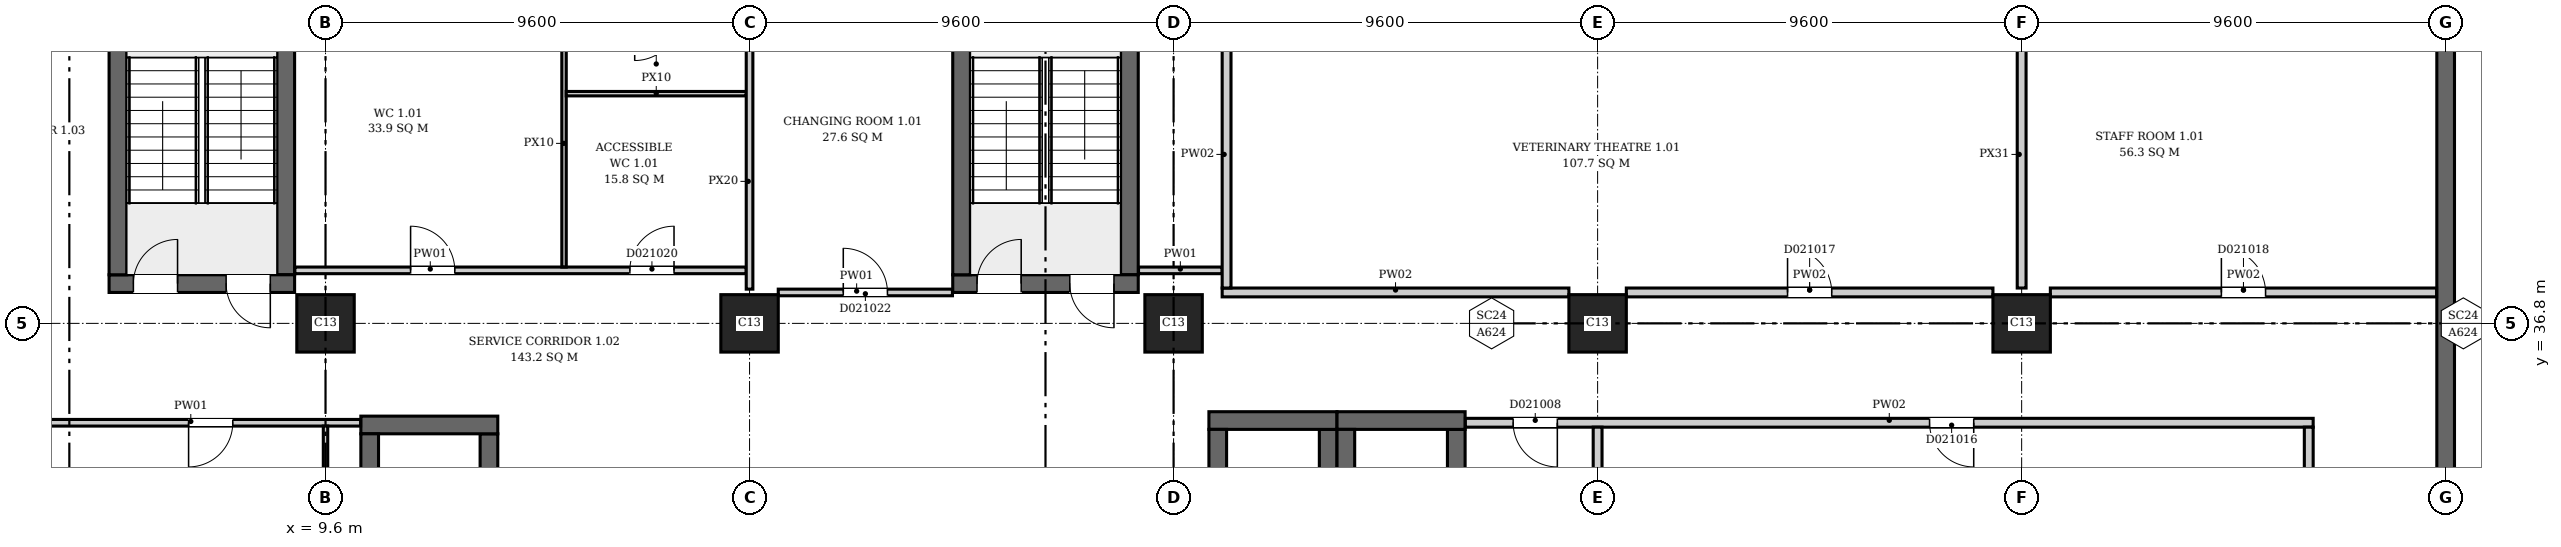
"""IFC4 building model, lengths in metres.
Left out: names, types, materials, properties, quantities, classifications, styles, units other than length and angle.
Written with IfcOpenShell. Run it as: python <this file> out.ifc"""

import sys

from ifc_helpers import new_model, si_unit, direction, frame, frame_2d, origin, origin_2d, place, context, subcontext, project, spatial, rectangle, extrude, element, fill, save


model = new_model("IFC4")
c1 = context("Model", 3, precision=1e-05, world=origin(), true_north=direction((0.0, 1.0)))
c2 = subcontext(c1, "Body", "Model", "MODEL_VIEW")
j1 = project(units=[si_unit("LENGTHUNIT", "METRE"), si_unit("PLANEANGLEUNIT", "RADIAN")], contexts=[c1])
p1 = place(None, origin())
s1 = spatial("IfcSite", under=j1, at=p1, CompositionType="ELEMENT")
p2 = place(p1, origin())
s2 = spatial("IfcBuilding", under=s1, at=p2, CompositionType="ELEMENT")
p3 = place(p2, frame((0.0, 0.0, 6.5)))
s3 = spatial("IfcBuildingStorey", under=s2, at=p3, CompositionType="ELEMENT", Elevation=6.5)
p4 = place(p3, frame((57.6, -0.2, 0.0), z_axis=(0.0, 0.0, 1.0), x_axis=(0.0, 1.0, 0.0)))
e1 = element("IfcWall", 1, at=p4, inside=s3, PredefinedType="SHEAR", context=c2, shape_type="SweptSolid", body=[
    extrude(rectangle(XDim=46.88, YDim=0.4, at=frame_2d((23.44, 0.0))), origin(), (0.0, 0.0, 1.0), 7.7),
])
p5 = place(p3, frame((4.7, 37.7, 0.0), z_axis=(0.0, 0.0, 1.0), x_axis=(1.0, 0.0, 0.0)))
e2 = element("IfcWall", 2, at=p5, inside=s3, PredefinedType="SHEAR", context=c2, shape_type="SweptSolid", body=[
    extrude(rectangle(XDim=4.2, YDim=0.4, at=frame_2d((2.1, 0.0))), origin(), (0.0, 0.0, 1.0), 7.7),
])
p6 = place(p5, frame((0.55, 0.0, 0.0)))
e3 = element("IfcOpeningElement", 3, at=p6, cuts=e2, PredefinedType="OPENING", context=c2, shape_type="SweptSolid", body=[
    extrude(rectangle(XDim=1.0, YDim=2.1, at=frame_2d((0.5, 1.05))), frame((0.0, 0.21, 0.0), z_axis=(0.0, -1.0, 0.0), x_axis=(1.0, 0.0, 0.0)), (0.0, 0.0, 1.0), 0.42),
])
p7 = place(p5, frame((2.65, 0.0, 0.0)))
e4 = element("IfcOpeningElement", 4, at=p7, cuts=e2, PredefinedType="OPENING", context=c2, shape_type="SweptSolid", body=[
    extrude(rectangle(XDim=1.0, YDim=2.1, at=frame_2d((0.5, 1.05))), frame((0.0, 0.21, 0.0), z_axis=(0.0, -1.0, 0.0), x_axis=(1.0, 0.0, 0.0)), (0.0, 0.0, 1.0), 0.42),
])
for number, where, z_axis, x_axis in (
    (5, (4.9, 37.9, 0.0), (0.0, 0.0, 1.0), (0.0, 1.0, 0.0)),
    (6, (8.7, 37.9, 0.0), (0.0, 0.0, 1.0), (0.0, 1.0, 0.0)),
):
    element("IfcWall", number, at=place(p3, frame(where, z_axis=z_axis, x_axis=x_axis)), inside=s3, PredefinedType="SHEAR", context=c2, shape_type="SweptSolid", body=[
        extrude(rectangle(XDim=6.6, YDim=0.4, at=frame_2d((3.3, 0.0))), origin(), (0.0, 0.0, 1.0), 7.7),
    ])
p8 = place(p3, frame((23.8, 37.7, 0.0), z_axis=(0.0, 0.0, 1.0), x_axis=(1.0, 0.0, 0.0)))
e7 = element("IfcWall", 7, at=p8, inside=s3, PredefinedType="SHEAR", context=c2, shape_type="SweptSolid", body=[
    extrude(rectangle(XDim=4.2, YDim=0.4, at=frame_2d((2.1, 0.0))), origin(), (0.0, 0.0, 1.0), 7.7),
])
p9 = place(p8, frame((0.55, 0.0, 0.0)))
e8 = element("IfcOpeningElement", 8, at=p9, cuts=e7, PredefinedType="OPENING", context=c2, shape_type="SweptSolid", body=[
    extrude(rectangle(XDim=1.0, YDim=2.1, at=frame_2d((0.5, 1.05))), frame((0.0, 0.21, 0.0), z_axis=(0.0, -1.0, 0.0), x_axis=(1.0, 0.0, 0.0)), (0.0, 0.0, 1.0), 0.42),
])
p10 = place(p8, frame((2.65, 0.0, 0.0)))
e9 = element("IfcOpeningElement", 9, at=p10, cuts=e7, PredefinedType="OPENING", context=c2, shape_type="SweptSolid", body=[
    extrude(rectangle(XDim=1.0, YDim=2.1, at=frame_2d((0.5, 1.05))), frame((0.0, 0.21, 0.0), z_axis=(0.0, -1.0, 0.0), x_axis=(1.0, 0.0, 0.0)), (0.0, 0.0, 1.0), 0.42),
])
for number, where, z_axis, x_axis in (
    (10, (24.0, 37.9, 0.0), (0.0, 0.0, 1.0), (0.0, 1.0, 0.0)),
    (11, (27.8, 37.9, 0.0), (0.0, 0.0, 1.0), (0.0, 1.0, 0.0)),
):
    element("IfcWall", number, at=place(p3, frame(where, z_axis=z_axis, x_axis=x_axis)), inside=s3, PredefinedType="SHEAR", context=c2, shape_type="SweptSolid", body=[
        extrude(rectangle(XDim=6.6, YDim=0.4, at=frame_2d((3.3, 0.0))), origin(), (0.0, 0.0, 1.0), 7.7),
    ])
p11 = place(p3, frame((10.4, 34.5, 0.0), z_axis=(0.0, 0.0, 1.0), x_axis=(1.0, 0.0, 0.0)))
e12 = element("IfcWall", 12, at=p11, inside=s3, PredefinedType="SHEAR", context=c2, shape_type="SweptSolid", body=[
    extrude(rectangle(XDim=3.1, YDim=0.4, at=frame_2d((1.55, 0.0))), origin(), (0.0, 0.0, 1.0), 7.7),
])
for number, where, z_axis, x_axis in (
    (13, (10.6, 30.9, 0.0), (0.0, 0.0, 1.0), (0.0, 1.0, 0.0)),
    (14, (13.3, 30.9, 0.0), (0.0, 0.0, 1.0), (0.0, 1.0, 0.0)),
):
    element("IfcWall", number, at=place(p3, frame(where, z_axis=z_axis, x_axis=x_axis)), inside=s3, PredefinedType="SHEAR", context=c2, shape_type="SweptSolid", body=[
        extrude(rectangle(XDim=3.4, YDim=0.4, at=frame_2d((1.7, 0.0))), origin(), (0.0, 0.0, 1.0), 7.7),
    ])
p12 = place(p3, frame((29.6, 34.6, 0.0), z_axis=(0.0, 0.0, 1.0), x_axis=(1.0, 0.0, 0.0)))
e15 = element("IfcWall", 15, at=p12, inside=s3, PredefinedType="SHEAR", context=c2, shape_type="SweptSolid", body=[
    extrude(rectangle(XDim=2.9, YDim=0.4, at=frame_2d((1.45, 0.0))), origin(), (0.0, 0.0, 1.0), 7.7),
])
for number, where, z_axis, x_axis in (
    (16, (29.8, 31.4, 0.0), (0.0, 0.0, 1.0), (0.0, 1.0, 0.0)),
    (17, (32.3, 31.4, 0.0), (0.0, 0.0, 1.0), (0.0, 1.0, 0.0)),
):
    element("IfcWall", number, at=place(p3, frame(where, z_axis=z_axis, x_axis=x_axis)), inside=s3, PredefinedType="SHEAR", context=c2, shape_type="SweptSolid", body=[
        extrude(rectangle(XDim=3.0, YDim=0.4, at=frame_2d((1.5, 0.0))), origin(), (0.0, 0.0, 1.0), 7.7),
    ])
p13 = place(p3, frame((32.5, 34.6, 0.0), z_axis=(0.0, 0.0, 1.0), x_axis=(1.0, 0.0, 0.0)))
e18 = element("IfcWall", 18, at=p13, inside=s3, PredefinedType="SHEAR", context=c2, shape_type="SweptSolid", body=[
    extrude(rectangle(XDim=2.9, YDim=0.4, at=frame_2d((1.45, 0.0))), origin(), (0.0, 0.0, 1.0), 7.7),
])
for number, where, z_axis, x_axis in (
    (19, (32.7, 31.4, 0.0), (0.0, 0.0, 1.0), (0.0, 1.0, 0.0)),
    (20, (35.2, 31.4, 0.0), (0.0, 0.0, 1.0), (0.0, 1.0, 0.0)),
):
    element("IfcWall", number, at=place(p3, frame(where, z_axis=z_axis, x_axis=x_axis)), inside=s3, PredefinedType="SHEAR", context=c2, shape_type="SweptSolid", body=[
        extrude(rectangle(XDim=3.0, YDim=0.4, at=frame_2d((1.5, 0.0))), origin(), (0.0, 0.0, 1.0), 7.7),
    ])
for number, where, z_axis, x_axis in (
    (21, (9.6, 36.8, 0.0), (0.0, 0.0, 1.0), (1.0, 0.0, 0.0)),
    (22, (19.2, 36.8, 0.0), (0.0, 0.0, 1.0), (1.0, 0.0, 0.0)),
    (23, (28.8, 36.8, 0.0), (0.0, 0.0, 1.0), (1.0, 0.0, 0.0)),
    (24, (38.4, 36.8, 0.0), (0.0, 0.0, 1.0), (1.0, 0.0, 0.0)),
    (25, (48.0, 36.8, 0.0), (0.0, 0.0, 1.0), (1.0, 0.0, 0.0)),
):
    element("IfcColumn", number, at=place(p3, frame(where, z_axis=z_axis, x_axis=x_axis)), inside=s3, PredefinedType="COLUMN", context=c2, shape_type="SweptSolid", body=[
        extrude(rectangle(XDim=1.3, YDim=1.3, at=origin_2d()), origin(), (0.0, 0.0, 1.0), 7.7),
    ])
p14 = place(p3, frame((2.706, 34.55, 0.0), z_axis=(0.0, 0.0, 1.0), x_axis=(1.0, 0.0, 0.0)))
e26 = element("IfcWall", 26, at=p14, inside=s3, PredefinedType="PARTITIONING", context=c2, shape_type="SweptSolid", body=[
    extrude(rectangle(XDim=7.688, YDim=0.15, at=frame_2d((3.844, 0.0))), origin(), (0.0, 0.0, 1.0), 7.35),
])
p15 = place(p14, frame((3.794, 0.0, 0.0)))
e27 = element("IfcOpeningElement", 27, at=p15, cuts=e26, PredefinedType="OPENING", context=c2, shape_type="SweptSolid", body=[
    extrude(rectangle(XDim=1.0, YDim=2.1, at=frame_2d((0.5, 1.05))), frame((0.0, 0.085, 0.0), z_axis=(0.0, -1.0, 0.0), x_axis=(1.0, 0.0, 0.0)), (0.0, 0.0, 1.0), 0.17),
])
p16 = place(p3, frame((8.906, 38.0, 0.0), z_axis=(0.0, 0.0, 1.0), x_axis=(1.0, 0.0, 0.0)))
e28 = element("IfcWall", 28, at=p16, inside=s3, PredefinedType="PARTITIONING", context=c2, shape_type="SweptSolid", body=[
    extrude(rectangle(XDim=10.219, YDim=0.15, at=frame_2d((5.109, 0.0))), origin(), (0.0, 0.0, 1.0), 7.35),
])
p17 = place(p16, frame((2.62, 0.0, 0.0)))
e29 = element("IfcOpeningElement", 29, at=p17, cuts=e28, PredefinedType="OPENING", context=c2, shape_type="SweptSolid", body=[
    extrude(rectangle(XDim=1.0, YDim=2.1, at=frame_2d((0.5, 1.05))), frame((0.0, 0.085, 0.0), z_axis=(0.0, -1.0, 0.0), x_axis=(1.0, 0.0, 0.0)), (0.0, 0.0, 1.0), 0.17),
])
p18 = place(p16, frame((7.584, 0.0, 0.0)))
e30 = element("IfcOpeningElement", 30, at=p18, cuts=e28, PredefinedType="OPENING", context=c2, shape_type="SweptSolid", body=[
    extrude(rectangle(XDim=1.0, YDim=2.1, at=frame_2d((0.5, 1.05))), frame((0.0, 0.085, 0.0), z_axis=(0.0, -1.0, 0.0), x_axis=(1.0, 0.0, 0.0)), (0.0, 0.0, 1.0), 0.17),
])
p19 = place(p3, frame((9.6, 31.075, 0.0), z_axis=(0.0, 0.0, 1.0), x_axis=(0.0, 1.0, 0.0)))
e31 = element("IfcWall", 31, at=p19, inside=s3, PredefinedType="PARTITIONING", context=c2, shape_type="SweptSolid", body=[
    extrude(rectangle(XDim=3.4, YDim=0.1, at=frame_2d((1.7, 0.0))), origin(), (0.0, 0.0, 1.0), 6.95),
])
p20 = place(p3, frame((15.0, 38.075, 0.0), z_axis=(0.0, 0.0, 1.0), x_axis=(0.0, 1.0, 0.0)))
e32 = element("IfcWall", 32, at=p20, inside=s3, PredefinedType="PARTITIONING", context=c2, shape_type="SweptSolid", body=[
    extrude(rectangle(XDim=5.6, YDim=0.1, at=frame_2d((2.8, 0.0))), origin(), (0.0, 0.0, 1.0), 7.35),
])
p21 = place(p3, frame((15.05, 42.0, 0.0), z_axis=(0.0, 0.0, 1.0), x_axis=(1.0, 0.0, 0.0)))
e33 = element("IfcWall", 33, at=p21, inside=s3, PredefinedType="PARTITIONING", context=c2, shape_type="SweptSolid", body=[
    extrude(rectangle(XDim=4.075, YDim=0.1, at=frame_2d((2.038, 0.0))), origin(), (0.0, 0.0, 1.0), 7.35),
])
p22 = place(p3, frame((19.2, 37.575, 0.0), z_axis=(0.0, 0.0, 1.0), x_axis=(0.0, 1.0, 0.0)))
e34 = element("IfcWall", 34, at=p22, inside=s3, PredefinedType="PARTITIONING", context=c2, shape_type="SweptSolid", body=[
    extrude(rectangle(XDim=6.1, YDim=0.15, at=frame_2d((3.05, 0.0))), origin(), (0.0, 0.0, 1.0), 6.95),
])
p23 = place(p3, frame((19.85, 37.5, 0.0), z_axis=(0.0, 0.0, 1.0), x_axis=(1.0, 0.0, 0.0)))
e35 = element("IfcWall", 35, at=p23, inside=s3, PredefinedType="PARTITIONING", context=c2, shape_type="SweptSolid", body=[
    extrude(rectangle(XDim=3.944, YDim=0.15, at=frame_2d((1.972, 0.0))), origin(), (0.0, 0.0, 1.0), 7.35),
])
p24 = place(p23, frame((1.472, 0.0, 0.0)))
e36 = element("IfcOpeningElement", 36, at=p24, cuts=e35, PredefinedType="OPENING", context=c2, shape_type="SweptSolid", body=[
    extrude(rectangle(XDim=1.0, YDim=2.1, at=frame_2d((0.5, 1.05))), frame((0.0, 0.085, 0.0), z_axis=(0.0, -1.0, 0.0), x_axis=(1.0, 0.0, 0.0)), (0.0, 0.0, 1.0), 0.17),
])
p25 = place(p3, frame((28.006, 38.0, 0.0), z_axis=(0.0, 0.0, 1.0), x_axis=(1.0, 0.0, 0.0)))
e37 = element("IfcWall", 37, at=p25, inside=s3, PredefinedType="PARTITIONING", context=c2, shape_type="SweptSolid", body=[
    extrude(rectangle(XDim=1.894, YDim=0.15, at=frame_2d((0.947, 0.0))), origin(), (0.0, 0.0, 1.0), 7.35),
])
p26 = place(p3, frame((29.9, 37.5, 0.0), z_axis=(0.0, 0.0, 1.0), x_axis=(1.0, 0.0, 0.0)))
e38 = element("IfcWall", 38, at=p26, inside=s3, PredefinedType="PARTITIONING", context=c2, shape_type="SweptSolid", body=[
    extrude(rectangle(XDim=7.85, YDim=0.2, at=frame_2d((3.925, 0.0))), origin(), (0.0, 0.0, 1.0), 7.35),
])
p27 = place(p3, frame((30.0, 37.6, 0.0), z_axis=(0.0, 0.0, 1.0), x_axis=(0.0, 1.0, 0.0)))
e39 = element("IfcWall", 39, at=p27, inside=s3, PredefinedType="PARTITIONING", context=c2, shape_type="SweptSolid", body=[
    extrude(rectangle(XDim=6.05, YDim=0.2, at=frame_2d((3.025, 0.0))), origin(), (0.0, 0.0, 1.0), 7.35),
])
p28 = place(p3, frame((35.406, 34.55, 0.0), z_axis=(0.0, 0.0, 1.0), x_axis=(1.0, 0.0, 0.0)))
e40 = element("IfcWall", 40, at=p28, inside=s3, PredefinedType="PARTITIONING", context=c2, shape_type="SweptSolid", body=[
    extrude(rectangle(XDim=19.194, YDim=0.2, at=frame_2d((9.597, 0.0))), origin(), (0.0, 0.0, 1.0), 7.35),
])
p29 = place(p28, frame((1.082, 0.0, 0.0)))
e41 = element("IfcOpeningElement", 41, at=p29, cuts=e40, PredefinedType="OPENING", context=c2, shape_type="SweptSolid", body=[
    extrude(rectangle(XDim=1.0, YDim=2.1, at=frame_2d((0.5, 1.05))), frame((0.0, 0.11, 0.0), z_axis=(0.0, -1.0, 0.0), x_axis=(1.0, 0.0, 0.0)), (0.0, 0.0, 1.0), 0.22),
])
p30 = place(p28, frame((10.509, 0.0, 0.0)))
e42 = element("IfcOpeningElement", 42, at=p30, cuts=e40, PredefinedType="OPENING", context=c2, shape_type="SweptSolid", body=[
    extrude(rectangle(XDim=1.0, YDim=2.1, at=frame_2d((0.5, 1.05))), frame((0.0, 0.11, 0.0), z_axis=(0.0, -1.0, 0.0), x_axis=(1.0, 0.0, 0.0)), (0.0, 0.0, 1.0), 0.22),
])
p31 = place(p3, frame((38.4, 28.25, 0.0), z_axis=(0.0, 0.0, 1.0), x_axis=(0.0, 1.0, 0.0)))
e43 = element("IfcWall", 43, at=p31, inside=s3, PredefinedType="PARTITIONING", context=c2, shape_type="SweptSolid", body=[
    extrude(rectangle(XDim=6.2, YDim=0.2, at=frame_2d((3.1, 0.0))), origin(), (0.0, 0.0, 1.0), 6.95),
])
p32 = place(p3, frame((39.05, 37.5, 0.0), z_axis=(0.0, 0.0, 1.0), x_axis=(1.0, 0.0, 0.0)))
e44 = element("IfcWall", 44, at=p32, inside=s3, PredefinedType="PARTITIONING", context=c2, shape_type="SweptSolid", body=[
    extrude(rectangle(XDim=8.3, YDim=0.2, at=frame_2d((4.15, 0.0))), origin(), (0.0, 0.0, 1.0), 7.35),
])
p33 = place(p32, frame((3.65, 0.0, 0.0)))
e45 = element("IfcOpeningElement", 45, at=p33, cuts=e44, PredefinedType="OPENING", context=c2, shape_type="SweptSolid", body=[
    extrude(rectangle(XDim=1.0, YDim=2.1, at=frame_2d((0.5, 1.05))), frame((0.0, 0.11, 0.0), z_axis=(0.0, -1.0, 0.0), x_axis=(1.0, 0.0, 0.0)), (0.0, 0.0, 1.0), 0.22),
])
p34 = place(p3, frame((48.0, 37.6, 0.0), z_axis=(0.0, 0.0, 1.0), x_axis=(0.0, 1.0, 0.0)))
e46 = element("IfcWall", 46, at=p34, inside=s3, PredefinedType="PARTITIONING", context=c2, shape_type="SweptSolid", body=[
    extrude(rectangle(XDim=6.05, YDim=0.2, at=frame_2d((3.025, 0.0))), origin(), (0.0, 0.0, 1.0), 6.95),
])
p35 = place(p3, frame((48.65, 37.5, 0.0), z_axis=(0.0, 0.0, 1.0), x_axis=(1.0, 0.0, 0.0)))
e47 = element("IfcWall", 47, at=p35, inside=s3, PredefinedType="PARTITIONING", context=c2, shape_type="SweptSolid", body=[
    extrude(rectangle(XDim=8.744, YDim=0.2, at=frame_2d((4.372, 0.0))), origin(), (0.0, 0.0, 1.0), 7.35),
])
p36 = place(p35, frame((3.872, 0.0, 0.0)))
e48 = element("IfcOpeningElement", 48, at=p36, cuts=e47, PredefinedType="OPENING", context=c2, shape_type="SweptSolid", body=[
    extrude(rectangle(XDim=1.0, YDim=2.1, at=frame_2d((0.5, 1.05))), frame((0.0, 0.11, 0.0), z_axis=(0.0, -1.0, 0.0), x_axis=(1.0, 0.0, 0.0)), (0.0, 0.0, 1.0), 0.22),
])
p37 = place(p3, frame((54.5, 19.1, 0.0), z_axis=(0.0, 0.0, 1.0), x_axis=(0.0, 1.0, 0.0)))
e49 = element("IfcWall", 49, at=p37, inside=s3, PredefinedType="PARTITIONING", context=c2, shape_type="SweptSolid", body=[
    extrude(rectangle(XDim=15.35, YDim=0.2, at=frame_2d((7.675, 0.0))), origin(), (0.0, 0.0, 1.0), 7.35),
])
p38 = place(p6, origin())
e50 = element("IfcDoor", 50, at=p38, inside=s3, OperationType="SINGLE_SWING_RIGHT", PredefinedType="DOOR", context=c2, shape_type="SweptSolid", body=[
    extrude(rectangle(XDim=1.0, YDim=2.1, at=frame_2d((0.5, 1.05))), frame((0.0, 0.025, 0.0), z_axis=(0.0, -1.0, 0.0), x_axis=(1.0, 0.0, 0.0)), (0.0, 0.0, 1.0), 0.05),
])
fill(e3, e50)
p39 = place(p7, origin())
e51 = element("IfcDoor", 51, at=p39, inside=s3, OperationType="SINGLE_SWING_LEFT", PredefinedType="DOOR", context=c2, shape_type="SweptSolid", body=[
    extrude(rectangle(XDim=1.0, YDim=2.1, at=frame_2d((0.5, 1.05))), frame((0.0, 0.025, 0.0), z_axis=(0.0, -1.0, 0.0), x_axis=(1.0, 0.0, 0.0)), (0.0, 0.0, 1.0), 0.05),
])
fill(e4, e51)
p40 = place(p9, origin())
e52 = element("IfcDoor", 52, at=p40, inside=s3, OperationType="SINGLE_SWING_RIGHT", PredefinedType="DOOR", context=c2, shape_type="SweptSolid", body=[
    extrude(rectangle(XDim=1.0, YDim=2.1, at=frame_2d((0.5, 1.05))), frame((0.0, 0.025, 0.0), z_axis=(0.0, -1.0, 0.0), x_axis=(1.0, 0.0, 0.0)), (0.0, 0.0, 1.0), 0.05),
])
fill(e8, e52)
p41 = place(p10, origin())
e53 = element("IfcDoor", 53, at=p41, inside=s3, OperationType="SINGLE_SWING_LEFT", PredefinedType="DOOR", context=c2, shape_type="SweptSolid", body=[
    extrude(rectangle(XDim=1.0, YDim=2.1, at=frame_2d((0.5, 1.05))), frame((0.0, 0.025, 0.0), z_axis=(0.0, -1.0, 0.0), x_axis=(1.0, 0.0, 0.0)), (0.0, 0.0, 1.0), 0.05),
])
fill(e9, e53)
p42 = place(p15, origin())
e54 = element("IfcDoor", 54, at=p42, inside=s3, OperationType="SINGLE_SWING_LEFT", PredefinedType="DOOR", context=c2, shape_type="SweptSolid", body=[
    extrude(rectangle(XDim=1.0, YDim=2.1, at=frame_2d((0.5, 1.05))), frame((0.0, 0.025, 0.0), z_axis=(0.0, -1.0, 0.0), x_axis=(1.0, 0.0, 0.0)), (0.0, 0.0, 1.0), 0.05),
])
fill(e27, e54)
p43 = place(p29, origin())
e55 = element("IfcDoor", 55, at=p43, inside=s3, OperationType="SINGLE_SWING_RIGHT", PredefinedType="DOOR", context=c2, shape_type="SweptSolid", body=[
    extrude(rectangle(XDim=1.0, YDim=2.1, at=frame_2d((0.5, 1.05))), frame((0.0, 0.025, 0.0), z_axis=(0.0, -1.0, 0.0), x_axis=(1.0, 0.0, 0.0)), (0.0, 0.0, 1.0), 0.05),
])
fill(e41, e55)
p44 = place(p30, origin())
e56 = element("IfcDoor", 56, at=p44, inside=s3, OperationType="SINGLE_SWING_RIGHT", PredefinedType="DOOR", context=c2, shape_type="SweptSolid", body=[
    extrude(rectangle(XDim=1.0, YDim=2.1, at=frame_2d((0.5, 1.05))), frame((0.0, 0.025, 0.0), z_axis=(0.0, -1.0, 0.0), x_axis=(1.0, 0.0, 0.0)), (0.0, 0.0, 1.0), 0.05),
])
fill(e42, e56)
p45 = place(p33, origin())
e57 = element("IfcDoor", 57, at=p45, inside=s3, OperationType="SINGLE_SWING_LEFT", PredefinedType="DOOR", context=c2, shape_type="SweptSolid", body=[
    extrude(rectangle(XDim=1.0, YDim=2.1, at=frame_2d((0.5, 1.05))), frame((0.0, 0.025, 0.0), z_axis=(0.0, -1.0, 0.0), x_axis=(1.0, 0.0, 0.0)), (0.0, 0.0, 1.0), 0.05),
])
fill(e45, e57)
p46 = place(p36, origin())
e58 = element("IfcDoor", 58, at=p46, inside=s3, OperationType="SINGLE_SWING_LEFT", PredefinedType="DOOR", context=c2, shape_type="SweptSolid", body=[
    extrude(rectangle(XDim=1.0, YDim=2.1, at=frame_2d((0.5, 1.05))), frame((0.0, 0.025, 0.0), z_axis=(0.0, -1.0, 0.0), x_axis=(1.0, 0.0, 0.0)), (0.0, 0.0, 1.0), 0.05),
])
fill(e48, e58)
p47 = place(p17, origin())
e59 = element("IfcDoor", 59, at=p47, inside=s3, OperationType="SINGLE_SWING_LEFT", PredefinedType="DOOR", context=c2, shape_type="SweptSolid", body=[
    extrude(rectangle(XDim=1.0, YDim=2.1, at=frame_2d((0.5, 1.05))), frame((0.0, 0.025, 0.0), z_axis=(0.0, -1.0, 0.0), x_axis=(1.0, 0.0, 0.0)), (0.0, 0.0, 1.0), 0.05),
])
fill(e29, e59)
p48 = place(p18, origin())
e60 = element("IfcDoor", 60, at=p48, inside=s3, OperationType="SINGLE_SWING_RIGHT", PredefinedType="DOOR", context=c2, shape_type="SweptSolid", body=[
    extrude(rectangle(XDim=1.0, YDim=2.1, at=frame_2d((0.5, 1.05))), frame((0.0, 0.025, 0.0), z_axis=(0.0, -1.0, 0.0), x_axis=(1.0, 0.0, 0.0)), (0.0, 0.0, 1.0), 0.05),
])
fill(e30, e60)
p49 = place(p24, origin())
e61 = element("IfcDoor", 61, at=p49, inside=s3, OperationType="SINGLE_SWING_LEFT", PredefinedType="DOOR", context=c2, shape_type="SweptSolid", body=[
    extrude(rectangle(XDim=1.0, YDim=2.1, at=frame_2d((0.5, 1.05))), frame((0.0, 0.025, 0.0), z_axis=(0.0, -1.0, 0.0), x_axis=(1.0, 0.0, 0.0)), (0.0, 0.0, 1.0), 0.05),
])
fill(e36, e61)
save(model, sys.argv[1])
